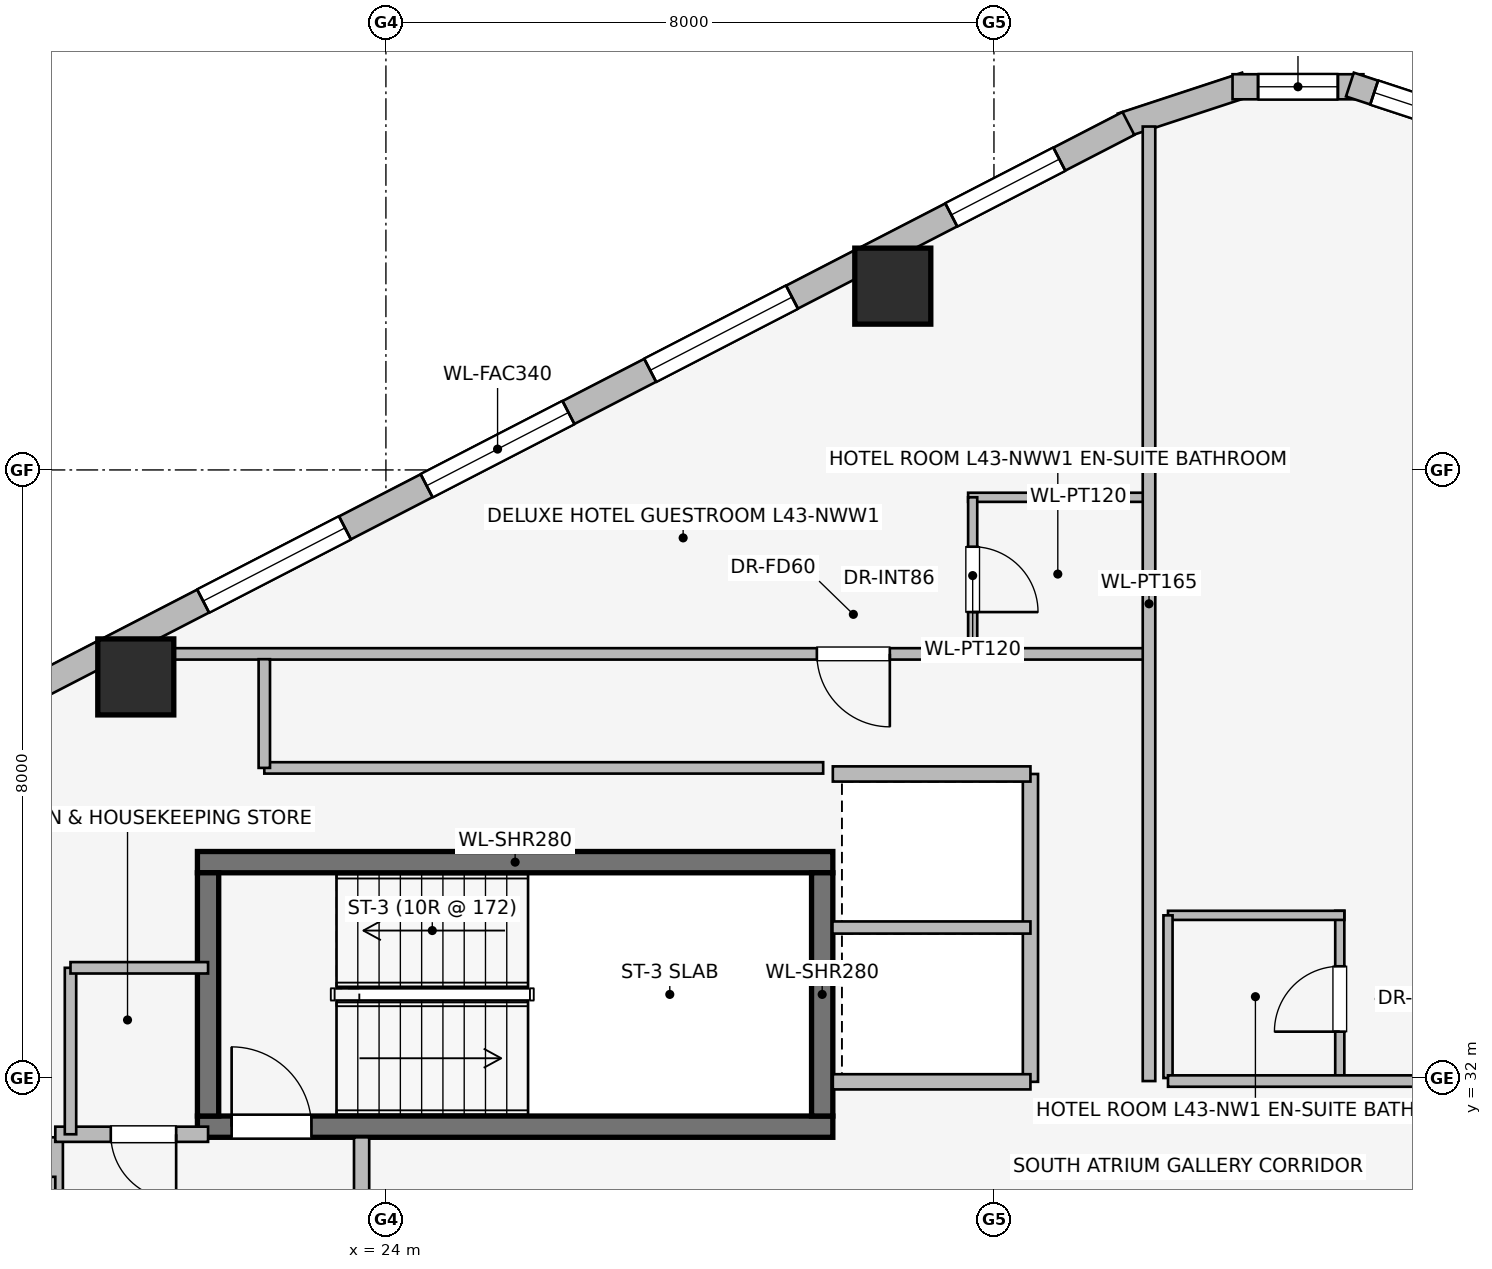
"""IFC4 building model, lengths in metres.
Left out: names, types, materials, properties, quantities, classifications, styles, units other than length and angle.
Written with IfcOpenShell. Run it as: python <this file> out.ifc"""

import sys

from ifc_helpers import new_model, si_unit, direction, frame, frame_2d, origin, origin_2d, place, context, subcontext, project, spatial, rectangle, extrude, element, fill, save


model = new_model("IFC4")
c1 = context("Model", 3, precision=1e-05, world=origin(), true_north=direction((0.0, 1.0)))
c2 = subcontext(c1, "Body", "Model", "MODEL_VIEW")
j1 = project(units=[si_unit("LENGTHUNIT", "METRE"), si_unit("PLANEANGLEUNIT", "RADIAN")], contexts=[c1])
p1 = place(None, origin())
s1 = spatial("IfcSite", under=j1, at=p1, CompositionType="ELEMENT")
p2 = place(p1, origin())
s2 = spatial("IfcBuilding", under=s1, at=p2, CompositionType="ELEMENT")
p3 = place(p2, frame((0.0, 0.0, 160.2)))
s3 = spatial("IfcBuildingStorey", under=s2, at=p3, CompositionType="ELEMENT", Elevation=160.2)
p4 = place(p3, frame((21.52, 31.36, 0.0), z_axis=(0.0, 0.0, 1.0), x_axis=(1.0, 0.0, 0.0)))
e1 = element("IfcWall", 1, at=p4, inside=s3, PredefinedType="SHEAR", context=c2, shape_type="SweptSolid", body=[
    extrude(rectangle(XDim=8.36, YDim=0.28, at=frame_2d((4.18, 0.0))), origin(), (0.0, 0.0, 1.0), 3.45),
])
p5 = place(p4, frame((0.45, 0.0, 0.0)))
e2 = element("IfcOpeningElement", 2, at=p5, cuts=e1, PredefinedType="OPENING", context=c2, shape_type="SweptSolid", body=[
    extrude(rectangle(XDim=1.05, YDim=2.0, at=frame_2d((0.525, 1.0))), frame((0.0, 0.15, 0.0), z_axis=(0.0, -1.0, 0.0), x_axis=(1.0, 0.0, 0.0)), (0.0, 0.0, 1.0), 0.3),
])
p6 = place(p3, frame((29.88, 34.84, 0.0), z_axis=(0.0, 0.0, 1.0), x_axis=(-1.0, 0.0, 0.0)))
e3 = element("IfcWall", 3, at=p6, inside=s3, PredefinedType="SHEAR", context=c2, shape_type="SweptSolid", body=[
    extrude(rectangle(XDim=8.36, YDim=0.28, at=frame_2d((4.18, 0.0))), origin(), (0.0, 0.0, 1.0), 3.45),
])
for number, where, z_axis, x_axis in (
    (4, (21.66, 34.7, 0.0), (0.0, 0.0, 1.0), (0.0, -1.0, 0.0)),
    (5, (29.74, 31.5, 0.0), (0.0, 0.0, 1.0), (0.0, 1.0, 0.0)),
):
    element("IfcWall", number, at=place(p3, frame(where, z_axis=z_axis, x_axis=x_axis)), inside=s3, PredefinedType="SHEAR", context=c2, shape_type="SweptSolid", body=[
        extrude(rectangle(XDim=3.2, YDim=0.28, at=frame_2d((1.6, 0.0))), origin(), (0.0, 0.0, 1.0), 3.45),
    ])
for number, where, z_axis, x_axis in (
    (6, (30.669, 42.418, 0.0), (0.0, 0.0, 1.0), (1.0, 0.0, 0.0)),
    (7, (20.709, 37.277, 0.0), (0.0, 0.0, 1.0), (1.0, 0.0, 0.0)),
):
    element("IfcColumn", number, at=place(p3, frame(where, z_axis=z_axis, x_axis=x_axis)), inside=s3, PredefinedType="COLUMN", context=c2, shape_type="SweptSolid", body=[
        extrude(rectangle(XDim=1.0, YDim=1.0, at=origin_2d()), origin(), (0.0, 0.0, 1.0), 3.45),
    ])
p7 = place(p3, frame((33.681, 44.532, 0.0), z_axis=(0.0, 0.0, 1.0), x_axis=(0.949937416267, 0.312440242569, 0.0)))
e8 = element("IfcWall", 8, at=p7, inside=s3, PredefinedType="STANDARD", context=c2, shape_type="SweptSolid", body=[
    extrude(rectangle(XDim=1.722, YDim=0.33, at=frame_2d((0.861, 0.0))), origin(), (0.0, 0.0, 1.0), 3.03),
])
p8 = place(p3, frame((35.139, 45.041, 0.0), z_axis=(0.0, 0.0, 1.0), x_axis=(1.0, 0.0, 0.0)))
e9 = element("IfcWall", 9, at=p8, inside=s3, PredefinedType="STANDARD", context=c2, shape_type="SweptSolid", body=[
    extrude(rectangle(XDim=1.722, YDim=0.33, at=frame_2d((0.861, 0.0))), origin(), (0.0, 0.0, 1.0), 3.03),
])
p9 = place(p8, frame((0.336, 0.0, 0.75)))
e10 = element("IfcOpeningElement", 10, at=p9, cuts=e9, PredefinedType="OPENING", context=c2, shape_type="SweptSolid", body=[
    extrude(rectangle(XDim=1.05, YDim=1.4, at=frame_2d((0.525, 0.7))), frame((0.0, 0.175, 0.0), z_axis=(0.0, -1.0, 0.0), x_axis=(1.0, 0.0, 0.0)), (0.0, 0.0, 1.0), 0.35),
])
p10 = place(p3, frame((36.683, 45.07, 0.0), z_axis=(0.0, 0.0, 1.0), x_axis=(0.949937416267, -0.312440242569, 0.0)))
e11 = element("IfcWall", 11, at=p10, inside=s3, PredefinedType="STANDARD", context=c2, shape_type="SweptSolid", body=[
    extrude(rectangle(XDim=1.722, YDim=0.33, at=frame_2d((0.861, 0.0))), origin(), (0.0, 0.0, 1.0), 3.03),
])
p11 = place(p10, frame((0.336, 0.0, 0.75)))
e12 = element("IfcOpeningElement", 12, at=p11, cuts=e11, PredefinedType="OPENING", context=c2, shape_type="SweptSolid", body=[
    extrude(rectangle(XDim=1.05, YDim=1.4, at=frame_2d((0.525, 0.7))), frame((0.0, 0.175, 0.0), z_axis=(0.0, -1.0, 0.0), x_axis=(1.0, 0.0, 0.0)), (0.0, 0.0, 1.0), 0.35),
])
p12 = place(p3, frame((17.169, 35.99, 0.0), z_axis=(0.0, 0.0, 1.0), x_axis=(0.888613612362, 0.458656568606, 0.0)))
e13 = element("IfcWall", 13, at=p12, inside=s3, PredefinedType="STANDARD", context=c2, shape_type="SweptSolid", body=[
    extrude(rectangle(XDim=18.681, YDim=0.34, at=frame_2d((9.34, 0.0))), origin(), (0.0, 0.0, 1.0), 3.03),
])
p13 = place(p12, frame((1.023, 0.0, 0.75)))
e14 = element("IfcOpeningElement", 14, at=p13, cuts=e13, PredefinedType="OPENING", context=c2, shape_type="SweptSolid", body=[
    extrude(rectangle(XDim=1.6, YDim=1.55, at=frame_2d((0.8, 0.775))), frame((0.0, 0.18, 0.0), z_axis=(0.0, -1.0, 0.0), x_axis=(1.0, 0.0, 0.0)), (0.0, 0.0, 1.0), 0.36),
])
p14 = place(p12, frame((4.981, 0.0, 0.75)))
e15 = element("IfcOpeningElement", 15, at=p14, cuts=e13, PredefinedType="OPENING", context=c2, shape_type="SweptSolid", body=[
    extrude(rectangle(XDim=2.1, YDim=1.5, at=frame_2d((1.05, 0.75))), frame((0.0, 0.18, 0.0), z_axis=(0.0, -1.0, 0.0), x_axis=(1.0, 0.0, 0.0)), (0.0, 0.0, 1.0), 0.36),
])
p15 = place(p12, frame((8.29, 0.0, 0.75)))
e16 = element("IfcOpeningElement", 16, at=p15, cuts=e13, PredefinedType="OPENING", context=c2, shape_type="SweptSolid", body=[
    extrude(rectangle(XDim=2.1, YDim=1.5, at=frame_2d((1.05, 0.75))), frame((0.0, 0.18, 0.0), z_axis=(0.0, -1.0, 0.0), x_axis=(1.0, 0.0, 0.0)), (0.0, 0.0, 1.0), 0.36),
])
p16 = place(p12, frame((11.6, 0.0, 0.75)))
e17 = element("IfcOpeningElement", 17, at=p16, cuts=e13, PredefinedType="OPENING", context=c2, shape_type="SweptSolid", body=[
    extrude(rectangle(XDim=2.1, YDim=1.5, at=frame_2d((1.05, 0.75))), frame((0.0, 0.18, 0.0), z_axis=(0.0, -1.0, 0.0), x_axis=(1.0, 0.0, 0.0)), (0.0, 0.0, 1.0), 0.36),
])
p17 = place(p12, frame((16.058, 0.0, 0.75)))
e18 = element("IfcOpeningElement", 18, at=p17, cuts=e13, PredefinedType="OPENING", context=c2, shape_type="SweptSolid", body=[
    extrude(rectangle(XDim=1.6, YDim=1.55, at=frame_2d((0.8, 0.775))), frame((0.0, 0.18, 0.0), z_axis=(0.0, -1.0, 0.0), x_axis=(1.0, 0.0, 0.0)), (0.0, 0.0, 1.0), 0.36),
])
p18 = place(p3, frame((19.65, 25.68, 0.0), z_axis=(0.0, 0.0, 1.0), x_axis=(0.0, 1.0, 0.0)))
e19 = element("IfcWall", 19, at=p18, inside=s3, PredefinedType="PARTITIONING", context=c2, shape_type="SweptSolid", body=[
    extrude(rectangle(XDim=5.54, YDim=0.2, at=frame_2d((2.77, 0.0))), origin(), (0.0, 0.0, 1.0), 3.03),
])
p19 = place(p18, frame((0.62, 0.0, 0.0)))
e20 = element("IfcOpeningElement", 20, at=p19, cuts=e19, PredefinedType="OPENING", context=c2, shape_type="SweptSolid", body=[
    extrude(rectangle(XDim=1.1, YDim=2.2, at=frame_2d((0.55, 1.1))), frame((0.0, 0.11, 0.0), z_axis=(0.0, -1.0, 0.0), x_axis=(1.0, 0.0, 0.0)), (0.0, 0.0, 1.0), 0.22),
])
p20 = place(p18, frame((3.12, 0.0, 0.0)))
e21 = element("IfcOpeningElement", 21, at=p20, cuts=e19, PredefinedType="OPENING", context=c2, shape_type="SweptSolid", body=[
    extrude(rectangle(XDim=1.1, YDim=2.2, at=frame_2d((0.55, 1.1))), frame((0.0, 0.11, 0.0), z_axis=(0.0, -1.0, 0.0), x_axis=(1.0, 0.0, 0.0)), (0.0, 0.0, 1.0), 0.22),
])
p21 = place(p3, frame((23.68, 25.68, 0.0), z_axis=(0.0, 0.0, 1.0), x_axis=(0.0, 1.0, 0.0)))
e22 = element("IfcWall", 22, at=p21, inside=s3, PredefinedType="PARTITIONING", context=c2, shape_type="SweptSolid", body=[
    extrude(rectangle(XDim=5.54, YDim=0.2, at=frame_2d((2.77, 0.0))), origin(), (0.0, 0.0, 1.0), 3.03),
])
p22 = place(p21, frame((1.8, 0.0, 0.0)))
e23 = element("IfcOpeningElement", 23, at=p22, cuts=e22, PredefinedType="OPENING", context=c2, shape_type="SweptSolid", body=[
    extrude(rectangle(XDim=1.05, YDim=2.0, at=frame_2d((0.525, 1.0))), frame((0.0, 0.11, 0.0), z_axis=(0.0, -1.0, 0.0), x_axis=(1.0, 0.0, 0.0)), (0.0, 0.0, 1.0), 0.22),
])
p23 = place(p3, frame((21.66, 31.26, 0.0), z_axis=(0.0, 0.0, 1.0), x_axis=(-1.0, 0.0, 0.0)))
e24 = element("IfcWall", 24, at=p23, inside=s3, PredefinedType="PARTITIONING", context=c2, shape_type="SweptSolid", body=[
    extrude(rectangle(XDim=2.01, YDim=0.2, at=frame_2d((1.005, 0.0))), origin(), (0.0, 0.0, 1.0), 3.03),
])
p24 = place(p23, frame((0.42, 0.0, 0.0)))
e25 = element("IfcOpeningElement", 25, at=p24, cuts=e24, PredefinedType="OPENING", context=c2, shape_type="SweptSolid", body=[
    extrude(rectangle(XDim=0.86, YDim=2.0, at=frame_2d((0.43, 1.0))), frame((0.0, 0.11, 0.0), z_axis=(0.0, -1.0, 0.0), x_axis=(1.0, 0.0, 0.0)), (0.0, 0.0, 1.0), 0.22),
])
p25 = place(p3, frame((19.65, 30.6, 0.0), z_axis=(0.0, 0.0, 1.0), x_axis=(-1.0, 0.0, 0.0)))
e26 = element("IfcWall", 26, at=p25, inside=s3, PredefinedType="PARTITIONING", context=c2, shape_type="SweptSolid", body=[
    extrude(rectangle(XDim=2.5, YDim=0.2, at=frame_2d((1.25, 0.0))), origin(), (0.0, 0.0, 1.0), 1.93),
])
p26 = place(p3, frame((32.48, 31.95, 0.0), z_axis=(0.0, 0.0, 1.0), x_axis=(0.0, 1.0, 0.0)))
e27 = element("IfcWall", 27, at=p26, inside=s3, PredefinedType="PARTITIONING", context=c2, shape_type="SweptSolid", body=[
    extrude(rectangle(XDim=4.05, YDim=0.2, at=frame_2d((2.025, 0.0))), origin(), (0.0, 0.0, 1.0), 3.03),
])
for number, where, z_axis, x_axis in (
    (28, (29.88, 36.0, 0.0), (0.0, 0.0, 1.0), (1.0, 0.0, 0.0)),
    (29, (32.48, 31.95, 0.0), (0.0, 0.0, 1.0), (-1.0, 0.0, 0.0)),
):
    element("IfcWall", number, at=place(p3, frame(where, z_axis=z_axis, x_axis=x_axis)), inside=s3, PredefinedType="PARTITIONING", context=c2, shape_type="SweptSolid", body=[
        extrude(rectangle(XDim=2.6, YDim=0.2, at=frame_2d((1.3, 0.0))), origin(), (0.0, 0.0, 1.0), 3.03),
    ])
p27 = place(p3, frame((29.875, 33.98, 0.0), z_axis=(0.0, 0.0, 1.0), x_axis=(1.0, 0.0, 0.0)))
e30 = element("IfcWall", 30, at=p27, inside=s3, PredefinedType="PARTITIONING", context=c2, shape_type="SweptSolid", body=[
    extrude(rectangle(XDim=2.605, YDim=0.16, at=frame_2d((1.302, 0.0))), origin(), (0.0, 0.0, 1.0), 3.03),
])
p28 = place(p3, frame((19.85, 33.45, 0.0), z_axis=(0.0, 0.0, 1.0), x_axis=(0.0, -1.0, 0.0)))
e31 = element("IfcWall", 31, at=p28, inside=s3, PredefinedType="PARTITIONING", context=c2, shape_type="SweptSolid", body=[
    extrude(rectangle(XDim=2.19, YDim=0.15, at=frame_2d((1.095, 0.0))), origin(), (0.0, 0.0, 1.0), 3.03),
])
p29 = place(p3, frame((21.66, 33.45, 0.0), z_axis=(0.0, 0.0, 1.0), x_axis=(-1.0, 0.0, 0.0)))
e32 = element("IfcWall", 32, at=p29, inside=s3, PredefinedType="PARTITIONING", context=c2, shape_type="SweptSolid", body=[
    extrude(rectangle(XDim=1.81, YDim=0.15, at=frame_2d((0.905, 0.0))), origin(), (0.0, 0.0, 1.0), 3.03),
])
p30 = place(p3, frame((34.0, 39.64, 0.0), z_axis=(0.0, 0.0, 1.0), x_axis=(-1.0, 0.0, 0.0)))
e33 = element("IfcWall", 33, at=p30, inside=s3, PredefinedType="PARTITIONING", context=c2, shape_type="SweptSolid", body=[
    extrude(rectangle(XDim=2.34, YDim=0.12, at=frame_2d((1.17, 0.0))), origin(), (0.0, 0.0, 1.0), 3.03),
])
p31 = place(p3, frame((31.72, 39.64, 0.0), z_axis=(0.0, 0.0, 1.0), x_axis=(0.0, -1.0, 0.0)))
e34 = element("IfcWall", 34, at=p31, inside=s3, PredefinedType="PARTITIONING", context=c2, shape_type="SweptSolid", body=[
    extrude(rectangle(XDim=2.06, YDim=0.12, at=frame_2d((1.03, 0.0))), origin(), (0.0, 0.0, 1.0), 3.03),
])
p32 = place(p31, frame((0.65, 0.0, 0.0)))
e35 = element("IfcOpeningElement", 35, at=p32, cuts=e34, PredefinedType="OPENING", context=c2, shape_type="SweptSolid", body=[
    extrude(rectangle(XDim=0.86, YDim=2.0, at=frame_2d((0.43, 1.0))), frame((0.0, 0.07, 0.0), z_axis=(0.0, -1.0, 0.0), x_axis=(1.0, 0.0, 0.0)), (0.0, 0.0, 1.0), 0.14),
])
p33 = place(p3, frame((34.0, 37.58, 0.0), z_axis=(0.0, 0.0, 1.0), x_axis=(-1.0, 0.0, 0.0)))
e36 = element("IfcWall", 36, at=p33, inside=s3, PredefinedType="PARTITIONING", context=c2, shape_type="SweptSolid", body=[
    extrude(rectangle(XDim=13.707, YDim=0.15, at=frame_2d((6.854, 0.0))), origin(), (0.0, 0.0, 1.0), 2.422),
])
p34 = place(p33, frame((3.37, 0.0, 0.0)))
e37 = element("IfcOpeningElement", 37, at=p34, cuts=e36, PredefinedType="OPENING", context=c2, shape_type="SweptSolid", body=[
    extrude(rectangle(XDim=0.96, YDim=2.0, at=frame_2d((0.48, 1.0))), frame((0.0, 0.085, 0.0), z_axis=(0.0, -1.0, 0.0), x_axis=(1.0, 0.0, 0.0)), (0.0, 0.0, 1.0), 0.17),
])
p35 = place(p3, frame((34.04, 31.96, 0.0), z_axis=(0.0, 0.0, 1.0), x_axis=(0.0, 1.0, 0.0)))
e38 = element("IfcWall", 38, at=p35, inside=s3, PredefinedType="PARTITIONING", context=c2, shape_type="SweptSolid", body=[
    extrude(rectangle(XDim=12.558, YDim=0.165, at=frame_2d((6.279, 0.0))), origin(), (0.0, 0.0, 1.0), 3.03),
])
p36 = place(p3, frame((36.55, 31.96, 0.0), z_axis=(0.0, 0.0, 1.0), x_axis=(0.0, 1.0, 0.0)))
e39 = element("IfcWall", 39, at=p36, inside=s3, PredefinedType="PARTITIONING", context=c2, shape_type="SweptSolid", body=[
    extrude(rectangle(XDim=2.24, YDim=0.12, at=frame_2d((1.12, 0.0))), origin(), (0.0, 0.0, 1.0), 3.03),
])
p37 = place(p36, frame((0.65, 0.0, 0.0)))
e40 = element("IfcOpeningElement", 40, at=p37, cuts=e39, PredefinedType="OPENING", context=c2, shape_type="SweptSolid", body=[
    extrude(rectangle(XDim=0.86, YDim=2.0, at=frame_2d((0.43, 1.0))), frame((0.0, 0.07, 0.0), z_axis=(0.0, -1.0, 0.0), x_axis=(1.0, 0.0, 0.0)), (0.0, 0.0, 1.0), 0.14),
])
p38 = place(p3, frame((36.61, 34.14, 0.0), z_axis=(0.0, 0.0, 1.0), x_axis=(-1.0, 0.0, 0.0)))
e41 = element("IfcWall", 41, at=p38, inside=s3, PredefinedType="PARTITIONING", context=c2, shape_type="SweptSolid", body=[
    extrude(rectangle(XDim=2.32, YDim=0.12, at=frame_2d((1.16, 0.0))), origin(), (0.0, 0.0, 1.0), 3.03),
])
p39 = place(p3, frame((34.29, 34.14, 0.0), z_axis=(0.0, 0.0, 1.0), x_axis=(0.0, -1.0, 0.0)))
e42 = element("IfcWall", 42, at=p39, inside=s3, PredefinedType="PARTITIONING", context=c2, shape_type="SweptSolid", body=[
    extrude(rectangle(XDim=2.14, YDim=0.12, at=frame_2d((1.07, 0.0))), origin(), (0.0, 0.0, 1.0), 3.03),
])
p40 = place(p3, frame((45.494, 31.96, 0.0), z_axis=(0.0, 0.0, 1.0), x_axis=(-1.0, 0.0, 0.0)))
e43 = element("IfcWall", 43, at=p40, inside=s3, PredefinedType="PARTITIONING", context=c2, shape_type="SweptSolid", body=[
    extrude(rectangle(XDim=11.204, YDim=0.15, at=frame_2d((5.602, 0.0))), origin(), (0.0, 0.0, 1.0), 3.03),
])
p41 = place(p40, frame((3.903, 0.0, 0.0)))
e44 = element("IfcOpeningElement", 44, at=p41, cuts=e43, PredefinedType="OPENING", context=c2, shape_type="SweptSolid", body=[
    extrude(rectangle(XDim=0.96, YDim=2.0, at=frame_2d((0.48, 1.0))), frame((0.0, 0.085, 0.0), z_axis=(0.0, -1.0, 0.0), x_axis=(1.0, 0.0, 0.0)), (0.0, 0.0, 1.0), 0.17),
])
p42 = place(p3, frame((29.753, 36.08, 0.0), z_axis=(0.0, 0.0, 1.0), x_axis=(-1.0, 0.0, 0.0)))
e45 = element("IfcWall", 45, at=p42, inside=s3, PredefinedType="PARTITIONING", context=c2, shape_type="SweptSolid", body=[
    extrude(rectangle(XDim=7.353, YDim=0.15, at=frame_2d((3.677, 0.0))), origin(), (0.0, 0.0, 1.0), 2.422),
])
p43 = place(p3, frame((22.4, 36.08, 0.0), z_axis=(0.0, 0.0, 1.0), x_axis=(0.0, 1.0, 0.0)))
e46 = element("IfcWall", 46, at=p43, inside=s3, PredefinedType="PARTITIONING", context=c2, shape_type="SweptSolid", body=[
    extrude(rectangle(XDim=1.43, YDim=0.15, at=frame_2d((0.715, 0.0))), origin(), (0.0, 0.0, 1.0), 3.03),
])
p44 = place(p9, origin())
e47 = element("IfcWindow", 47, at=p44, inside=s3, PartitioningType="SINGLE_PANEL", PredefinedType="WINDOW", context=c2, shape_type="SweptSolid", body=[
    extrude(rectangle(XDim=1.05, YDim=1.4, at=frame_2d((0.525, 0.7))), frame((0.0, 0.03, 0.0), z_axis=(0.0, -1.0, 0.0), x_axis=(1.0, 0.0, 0.0)), (0.0, 0.0, 1.0), 0.06),
])
fill(e10, e47)
p45 = place(p11, origin())
e48 = element("IfcWindow", 48, at=p45, inside=s3, PartitioningType="SINGLE_PANEL", PredefinedType="WINDOW", context=c2, shape_type="SweptSolid", body=[
    extrude(rectangle(XDim=1.05, YDim=1.4, at=frame_2d((0.525, 0.7))), frame((0.0, 0.03, 0.0), z_axis=(0.0, -1.0, 0.0), x_axis=(1.0, 0.0, 0.0)), (0.0, 0.0, 1.0), 0.06),
])
fill(e12, e48)
p46 = place(p14, origin())
e49 = element("IfcWindow", 49, at=p46, inside=s3, PartitioningType="SINGLE_PANEL", PredefinedType="WINDOW", context=c2, shape_type="SweptSolid", body=[
    extrude(rectangle(XDim=2.1, YDim=1.5, at=frame_2d((1.05, 0.75))), frame((0.0, 0.03, 0.0), z_axis=(0.0, -1.0, 0.0), x_axis=(1.0, 0.0, 0.0)), (0.0, 0.0, 1.0), 0.06),
])
fill(e15, e49)
p47 = place(p15, origin())
e50 = element("IfcWindow", 50, at=p47, inside=s3, PartitioningType="SINGLE_PANEL", PredefinedType="WINDOW", context=c2, shape_type="SweptSolid", body=[
    extrude(rectangle(XDim=2.1, YDim=1.5, at=frame_2d((1.05, 0.75))), frame((0.0, 0.03, 0.0), z_axis=(0.0, -1.0, 0.0), x_axis=(1.0, 0.0, 0.0)), (0.0, 0.0, 1.0), 0.06),
])
fill(e16, e50)
p48 = place(p16, origin())
e51 = element("IfcWindow", 51, at=p48, inside=s3, PartitioningType="SINGLE_PANEL", PredefinedType="WINDOW", context=c2, shape_type="SweptSolid", body=[
    extrude(rectangle(XDim=2.1, YDim=1.5, at=frame_2d((1.05, 0.75))), frame((0.0, 0.03, 0.0), z_axis=(0.0, -1.0, 0.0), x_axis=(1.0, 0.0, 0.0)), (0.0, 0.0, 1.0), 0.06),
])
fill(e17, e51)
p49 = place(p17, origin())
e52 = element("IfcWindow", 52, at=p49, inside=s3, PartitioningType="SINGLE_PANEL", PredefinedType="WINDOW", context=c2, shape_type="SweptSolid", body=[
    extrude(rectangle(XDim=1.6, YDim=1.55, at=frame_2d((0.8, 0.775))), frame((0.0, 0.03, 0.0), z_axis=(0.0, -1.0, 0.0), x_axis=(1.0, 0.0, 0.0)), (0.0, 0.0, 1.0), 0.06),
])
fill(e18, e52)
p50 = place(p5, origin())
e53 = element("IfcDoor", 53, at=p50, inside=s3, OperationType="SINGLE_SWING_LEFT", PredefinedType="DOOR", context=c2, shape_type="SweptSolid", body=[
    extrude(rectangle(XDim=1.05, YDim=2.0, at=frame_2d((0.525, 1.0))), frame((0.0, 0.025, 0.0), z_axis=(0.0, -1.0, 0.0), x_axis=(1.0, 0.0, 0.0)), (0.0, 0.0, 1.0), 0.05),
])
fill(e2, e53)
p51 = place(p24, origin())
e54 = element("IfcDoor", 54, at=p51, inside=s3, OperationType="SINGLE_SWING_LEFT", PredefinedType="DOOR", context=c2, shape_type="SweptSolid", body=[
    extrude(rectangle(XDim=0.86, YDim=2.0, at=frame_2d((0.43, 1.0))), frame((0.0, 0.025, 0.0), z_axis=(0.0, -1.0, 0.0), x_axis=(1.0, 0.0, 0.0)), (0.0, 0.0, 1.0), 0.05),
])
fill(e25, e54)
p52 = place(p32, origin())
e55 = element("IfcDoor", 55, at=p52, inside=s3, OperationType="SINGLE_SWING_RIGHT", PredefinedType="DOOR", context=c2, shape_type="SweptSolid", body=[
    extrude(rectangle(XDim=0.86, YDim=2.0, at=frame_2d((0.43, 1.0))), frame((0.0, 0.025, 0.0), z_axis=(0.0, -1.0, 0.0), x_axis=(1.0, 0.0, 0.0)), (0.0, 0.0, 1.0), 0.05),
])
fill(e35, e55)
p53 = place(p34, origin())
e56 = element("IfcDoor", 56, at=p53, inside=s3, OperationType="SINGLE_SWING_LEFT", PredefinedType="DOOR", context=c2, shape_type="SweptSolid", body=[
    extrude(rectangle(XDim=0.96, YDim=2.0, at=frame_2d((0.48, 1.0))), frame((0.0, 0.025, 0.0), z_axis=(0.0, -1.0, 0.0), x_axis=(1.0, 0.0, 0.0)), (0.0, 0.0, 1.0), 0.05),
])
fill(e37, e56)
p54 = place(p37, origin())
e57 = element("IfcDoor", 57, at=p54, inside=s3, OperationType="SINGLE_SWING_LEFT", PredefinedType="DOOR", context=c2, shape_type="SweptSolid", body=[
    extrude(rectangle(XDim=0.86, YDim=2.0, at=frame_2d((0.43, 1.0))), frame((0.0, 0.025, 0.0), z_axis=(0.0, -1.0, 0.0), x_axis=(1.0, 0.0, 0.0)), (0.0, 0.0, 1.0), 0.05),
])
fill(e40, e57)
save(model, sys.argv[1])
